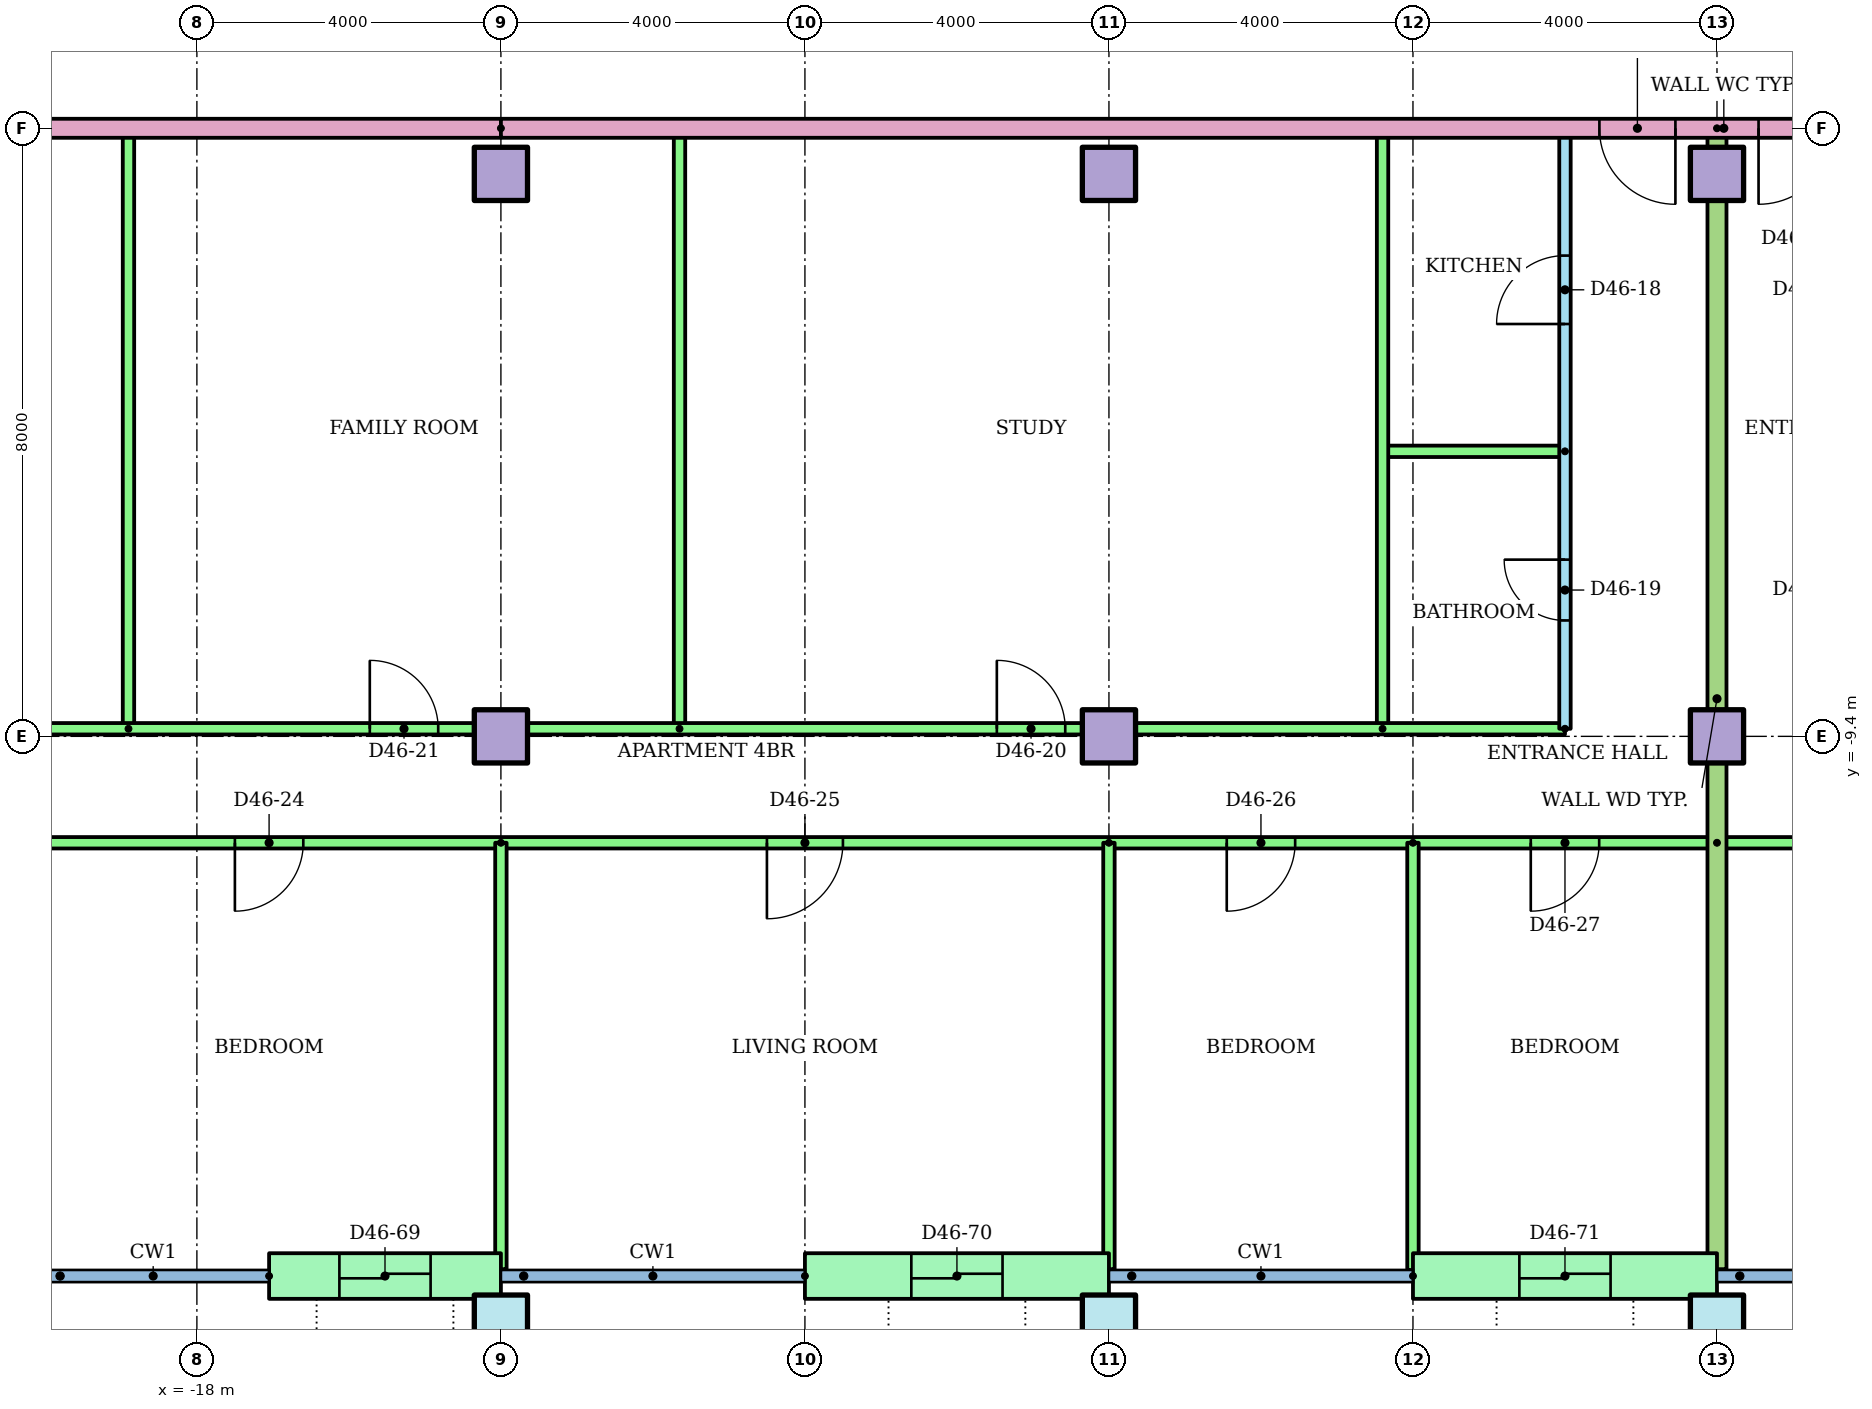
"""IFC4 building model, lengths in metres.
Left out: names, types, materials, properties, quantities, classifications, styles, units other than length and angle.
Written with IfcOpenShell. Run it as: python <this file> out.ifc"""

import sys

from ifc_helpers import new_model, si_unit, direction, frame, frame_2d, origin, origin_2d, place, context, subcontext, project, spatial, rectangle, hollow_rectangle, extrude, element, fill, save


model = new_model("IFC4")
c1 = context("Model", 3, precision=1e-05, world=origin(), true_north=direction((0.0, 1.0)))
c2 = subcontext(c1, "Body", "Model", "MODEL_VIEW")
j1 = project(units=[si_unit("LENGTHUNIT", "METRE"), si_unit("PLANEANGLEUNIT", "RADIAN")], contexts=[c1])
p1 = place(None, origin())
s1 = spatial("IfcSite", under=j1, at=p1, CompositionType="ELEMENT")
p2 = place(p1, origin())
s2 = spatial("IfcBuilding", under=s1, at=p2, CompositionType="ELEMENT")
p3 = place(p2, frame((0.0, 0.0, 178.1)))
s3 = spatial("IfcBuildingStorey", under=s2, at=p3, CompositionType="ELEMENT", Elevation=178.1)
for number, where in (
    (1, (-14.0, -17.1, 0.0)),
    (2, (-6.0, -17.1, 0.0)),
    (3, (2.0, -17.1, 0.0)),
):
    element("IfcColumn", number, at=place(p3, frame(where)), inside=s3, PredefinedType="COLUMN", context=c2, shape_type="SweptSolid", body=[
        extrude(hollow_rectangle(XDim=0.7, YDim=0.7, WallThickness=0.036, at=origin_2d()), origin(), (0.0, 0.0, 1.0), 3.2),
    ])
for number, where in (
    (4, (-14.0, -9.4, 0.0)),
    (5, (-6.0, -9.4, 0.0)),
    (6, (2.0, -9.4, 0.0)),
    (7, (-14.0, -2.0, 0.0)),
    (8, (-6.0, -2.0, 0.0)),
    (9, (2.0, -2.0, 0.0)),
):
    element("IfcColumn", number, at=place(p3, frame(where)), inside=s3, PredefinedType="COLUMN", context=c2, shape_type="SweptSolid", body=[
        extrude(rectangle(XDim=0.7, YDim=0.7, at=origin_2d()), origin(), (0.0, 0.0, 1.0), 3.2),
    ])
p4 = place(p3, frame((-17.05, -16.5, 0.0)))
e10 = element("IfcWall", 10, at=p4, inside=s3, PredefinedType="STANDARD", context=c2, shape_type="SweptSolid", body=[
    extrude(rectangle(XDim=3.05, YDim=0.6, at=frame_2d((1.525, 0.0))), origin(), (0.0, 0.0, 1.0), 2.92),
])
p5 = place(p4, frame((0.925, 0.0, 0.0)))
e11 = element("IfcOpeningElement", 11, at=p5, cuts=e10, PredefinedType="OPENING", context=c2, shape_type="SweptSolid", body=[
    extrude(rectangle(XDim=1.2, YDim=2.1, at=frame_2d((0.6, 1.05))), frame((0.0, 0.31, 0.0), z_axis=(0.0, -1.0, 0.0), x_axis=(1.0, 0.0, 0.0)), (0.0, 0.0, 1.0), 0.62),
])
p6 = place(p3, frame((-10.0, -16.5, 0.0)))
e12 = element("IfcWall", 12, at=p6, inside=s3, PredefinedType="STANDARD", context=c2, shape_type="SweptSolid", body=[
    extrude(rectangle(XDim=4.0, YDim=0.6, at=frame_2d((2.0, 0.0))), origin(), (0.0, 0.0, 1.0), 2.92),
])
p7 = place(p6, frame((1.4, 0.0, 0.0)))
e13 = element("IfcOpeningElement", 13, at=p7, cuts=e12, PredefinedType="OPENING", context=c2, shape_type="SweptSolid", body=[
    extrude(rectangle(XDim=1.2, YDim=2.1, at=frame_2d((0.6, 1.05))), frame((0.0, 0.31, 0.0), z_axis=(0.0, -1.0, 0.0), x_axis=(1.0, 0.0, 0.0)), (0.0, 0.0, 1.0), 0.62),
])
p8 = place(p3, frame((-2.0, -16.5, 0.0)))
e14 = element("IfcWall", 14, at=p8, inside=s3, PredefinedType="STANDARD", context=c2, shape_type="SweptSolid", body=[
    extrude(rectangle(XDim=4.0, YDim=0.6, at=frame_2d((2.0, 0.0))), origin(), (0.0, 0.0, 1.0), 2.92),
])
p9 = place(p8, frame((1.4, 0.0, 0.0)))
e15 = element("IfcOpeningElement", 15, at=p9, cuts=e14, PredefinedType="OPENING", context=c2, shape_type="SweptSolid", body=[
    extrude(rectangle(XDim=1.2, YDim=2.1, at=frame_2d((0.6, 1.05))), frame((0.0, 0.31, 0.0), z_axis=(0.0, -1.0, 0.0), x_axis=(1.0, 0.0, 0.0)), (0.0, 0.0, 1.0), 0.62),
])
p10 = place(p3, frame((0.0, -9.3, 0.0), z_axis=(0.0, 0.0, 1.0), x_axis=(0.0, 1.0, 0.0)))
e16 = element("IfcWall", 16, at=p10, inside=s3, PredefinedType="PARTITIONING", context=c2, shape_type="SweptSolid", body=[
    extrude(rectangle(XDim=7.9, YDim=0.15, at=frame_2d((3.95, 0.0))), origin(), (0.0, 0.0, 1.0), 2.4),
])
p11 = place(p10, frame((5.325, 0.0, 0.0)))
e17 = element("IfcOpeningElement", 17, at=p11, cuts=e16, PredefinedType="OPENING", context=c2, shape_type="SweptSolid", body=[
    extrude(rectangle(XDim=0.9, YDim=2.1, at=frame_2d((0.45, 1.05))), frame((0.0, 0.085, 0.0), z_axis=(0.0, -1.0, 0.0), x_axis=(1.0, 0.0, 0.0)), (0.0, 0.0, 1.0), 0.17),
])
p12 = place(p10, frame((1.425, 0.0, 0.0)))
e18 = element("IfcOpeningElement", 18, at=p12, cuts=e16, PredefinedType="OPENING", context=c2, shape_type="SweptSolid", body=[
    extrude(rectangle(XDim=0.8, YDim=2.1, at=frame_2d((0.4, 1.05))), frame((0.0, 0.085, 0.0), z_axis=(0.0, -1.0, 0.0), x_axis=(1.0, 0.0, 0.0)), (0.0, 0.0, 1.0), 0.17),
])
p13 = place(p3, frame((0.0, -5.65, 0.0), z_axis=(0.0, 0.0, 1.0), x_axis=(-1.0, 0.0, 0.0)))
e19 = element("IfcWall", 19, at=p13, inside=s3, PredefinedType="PARTITIONING", context=c2, shape_type="SweptSolid", body=[
    extrude(rectangle(XDim=2.4, YDim=0.15, at=frame_2d((1.2, 0.0))), origin(), (0.0, 0.0, 1.0), 2.4),
])
for number, where, z_axis, x_axis in (
    (20, (-2.4, -9.3, 0.0), (0.0, 0.0, 1.0), (0.0, 1.0, 0.0)),
    (21, (-11.65, -9.3, 0.0), (0.0, 0.0, 1.0), (0.0, 1.0, 0.0)),
    (22, (-18.9, -9.3, 0.0), (0.0, 0.0, 1.0), (0.0, 1.0, 0.0)),
):
    element("IfcWall", number, at=place(p3, frame(where, z_axis=z_axis, x_axis=x_axis)), inside=s3, PredefinedType="PARTITIONING", context=c2, shape_type="SweptSolid", body=[
        extrude(rectangle(XDim=7.9, YDim=0.15, at=frame_2d((3.95, 0.0))), origin(), (0.0, 0.0, 1.0), 2.4),
    ])
p14 = place(p3, frame((-24.81, -9.3, 0.0)))
e23 = element("IfcWall", 23, at=p14, inside=s3, PredefinedType="PARTITIONING", context=c2, shape_type="SweptSolid", body=[
    extrude(rectangle(XDim=24.81, YDim=0.15, at=frame_2d((12.405, 0.0))), origin(), (0.0, 0.0, 1.0), 2.4),
])
p15 = place(p14, frame((17.335, 0.0, 0.0)))
e24 = element("IfcOpeningElement", 24, at=p15, cuts=e23, PredefinedType="OPENING", context=c2, shape_type="SweptSolid", body=[
    extrude(rectangle(XDim=0.9, YDim=2.1, at=frame_2d((0.45, 1.05))), frame((0.0, 0.085, 0.0), z_axis=(0.0, -1.0, 0.0), x_axis=(1.0, 0.0, 0.0)), (0.0, 0.0, 1.0), 0.17),
])
p16 = place(p14, frame((9.085, 0.0, 0.0)))
e25 = element("IfcOpeningElement", 25, at=p16, cuts=e23, PredefinedType="OPENING", context=c2, shape_type="SweptSolid", body=[
    extrude(rectangle(XDim=0.9, YDim=2.1, at=frame_2d((0.45, 1.05))), frame((0.0, 0.085, 0.0), z_axis=(0.0, -1.0, 0.0), x_axis=(1.0, 0.0, 0.0)), (0.0, 0.0, 1.0), 0.17),
])
p17 = place(p14, frame((3.357, 0.0, 0.0)))
e26 = element("IfcOpeningElement", 26, at=p17, cuts=e23, PredefinedType="OPENING", context=c2, shape_type="SweptSolid", body=[
    extrude(rectangle(XDim=0.9, YDim=2.1, at=frame_2d((0.45, 1.05))), frame((0.0, 0.085, 0.0), z_axis=(0.0, -1.0, 0.0), x_axis=(1.0, 0.0, 0.0)), (0.0, 0.0, 1.0), 0.17),
])
p18 = place(p3, frame((2.0, -10.8, 0.0), z_axis=(0.0, 0.0, 1.0), x_axis=(-1.0, 0.0, 0.0)))
e27 = element("IfcWall", 27, at=p18, inside=s3, PredefinedType="PARTITIONING", context=c2, shape_type="SweptSolid", body=[
    extrude(rectangle(XDim=26.82, YDim=0.15, at=frame_2d((13.41, 0.0))), origin(), (0.0, 0.0, 1.0), 2.4),
])
p19 = place(p18, frame((24.547, 0.0, 0.0)))
e28 = element("IfcOpeningElement", 28, at=p19, cuts=e27, PredefinedType="OPENING", context=c2, shape_type="SweptSolid", body=[
    extrude(rectangle(XDim=0.9, YDim=2.1, at=frame_2d((0.45, 1.05))), frame((0.0, 0.085, 0.0), z_axis=(0.0, -1.0, 0.0), x_axis=(1.0, 0.0, 0.0)), (0.0, 0.0, 1.0), 0.17),
])
p20 = place(p18, frame((18.6, 0.0, 0.0)))
e29 = element("IfcOpeningElement", 29, at=p20, cuts=e27, PredefinedType="OPENING", context=c2, shape_type="SweptSolid", body=[
    extrude(rectangle(XDim=0.9, YDim=2.1, at=frame_2d((0.45, 1.05))), frame((0.0, 0.085, 0.0), z_axis=(0.0, -1.0, 0.0), x_axis=(1.0, 0.0, 0.0)), (0.0, 0.0, 1.0), 0.17),
])
p21 = place(p18, frame((11.5, 0.0, 0.0)))
e30 = element("IfcOpeningElement", 30, at=p21, cuts=e27, PredefinedType="OPENING", context=c2, shape_type="SweptSolid", body=[
    extrude(rectangle(XDim=1.0, YDim=2.1, at=frame_2d((0.5, 1.05))), frame((0.0, 0.085, 0.0), z_axis=(0.0, -1.0, 0.0), x_axis=(1.0, 0.0, 0.0)), (0.0, 0.0, 1.0), 0.17),
])
p22 = place(p18, frame((5.55, 0.0, 0.0)))
e31 = element("IfcOpeningElement", 31, at=p22, cuts=e27, PredefinedType="OPENING", context=c2, shape_type="SweptSolid", body=[
    extrude(rectangle(XDim=0.9, YDim=2.1, at=frame_2d((0.45, 1.05))), frame((0.0, 0.085, 0.0), z_axis=(0.0, -1.0, 0.0), x_axis=(1.0, 0.0, 0.0)), (0.0, 0.0, 1.0), 0.17),
])
p23 = place(p18, frame((1.55, 0.0, 0.0)))
e32 = element("IfcOpeningElement", 32, at=p23, cuts=e27, PredefinedType="OPENING", context=c2, shape_type="SweptSolid", body=[
    extrude(rectangle(XDim=0.9, YDim=2.1, at=frame_2d((0.45, 1.05))), frame((0.0, 0.085, 0.0), z_axis=(0.0, -1.0, 0.0), x_axis=(1.0, 0.0, 0.0)), (0.0, 0.0, 1.0), 0.17),
])
for number, where, z_axis, x_axis in (
    (33, (-14.0, -10.8, 0.0), (0.0, 0.0, 1.0), (0.0, -1.0, 0.0)),
    (34, (-6.0, -10.8, 0.0), (0.0, 0.0, 1.0), (0.0, -1.0, 0.0)),
):
    element("IfcWall", number, at=place(p3, frame(where, z_axis=z_axis, x_axis=x_axis)), inside=s3, PredefinedType="PARTITIONING", context=c2, shape_type="SweptSolid", body=[
        extrude(rectangle(XDim=5.61, YDim=0.15, at=frame_2d((2.805, 0.0))), origin(), (0.0, 0.0, 1.0), 2.4),
    ])
p24 = place(p3, frame((-2.0, -10.8, 0.0), z_axis=(0.0, 0.0, 1.0), x_axis=(0.0, -1.0, 0.0)))
e35 = element("IfcWall", 35, at=p24, inside=s3, PredefinedType="PARTITIONING", context=c2, shape_type="SweptSolid", body=[
    extrude(rectangle(XDim=5.621, YDim=0.15, at=frame_2d((2.811, 0.0))), origin(), (0.0, 0.0, 1.0), 2.4),
])
p25 = place(p3, frame((18.0, -10.8, 0.0), z_axis=(0.0, 0.0, 1.0), x_axis=(-1.0, 0.0, 0.0)))
e36 = element("IfcWall", 36, at=p25, inside=s3, PredefinedType="PARTITIONING", context=c2, shape_type="SweptSolid", body=[
    extrude(rectangle(XDim=16.0, YDim=0.15, at=frame_2d((8.0, 0.0))), origin(), (0.0, 0.0, 1.0), 2.4),
])
p26 = place(p25, frame((11.5, 0.0, 0.0)))
e37 = element("IfcOpeningElement", 37, at=p26, cuts=e36, PredefinedType="OPENING", context=c2, shape_type="SweptSolid", body=[
    extrude(rectangle(XDim=1.0, YDim=2.1, at=frame_2d((0.5, 1.05))), frame((0.0, 0.085, 0.0), z_axis=(0.0, -1.0, 0.0), x_axis=(1.0, 0.0, 0.0)), (0.0, 0.0, 1.0), 0.17),
])
p27 = place(p25, frame((5.55, 0.0, 0.0)))
e38 = element("IfcOpeningElement", 38, at=p27, cuts=e36, PredefinedType="OPENING", context=c2, shape_type="SweptSolid", body=[
    extrude(rectangle(XDim=0.9, YDim=2.1, at=frame_2d((0.45, 1.05))), frame((0.0, 0.085, 0.0), z_axis=(0.0, -1.0, 0.0), x_axis=(1.0, 0.0, 0.0)), (0.0, 0.0, 1.0), 0.17),
])
p28 = place(p25, frame((1.55, 0.0, 0.0)))
e39 = element("IfcOpeningElement", 39, at=p28, cuts=e36, PredefinedType="OPENING", context=c2, shape_type="SweptSolid", body=[
    extrude(rectangle(XDim=0.9, YDim=2.1, at=frame_2d((0.45, 1.05))), frame((0.0, 0.085, 0.0), z_axis=(0.0, -1.0, 0.0), x_axis=(1.0, 0.0, 0.0)), (0.0, 0.0, 1.0), 0.17),
])
p29 = place(p3, frame((2.0, -1.4, 0.0), z_axis=(0.0, 0.0, 1.0), x_axis=(0.0, -1.0, 0.0)))
e40 = element("IfcWall", 40, at=p29, inside=s3, PredefinedType="PARTITIONING", context=c2, shape_type="SweptSolid", body=[
    extrude(rectangle(XDim=15.01, YDim=0.25, at=frame_2d((7.505, 0.0))), origin(), (0.0, 0.0, 1.0), 2.4),
])
p30 = place(p3, frame((-14.0, -1.4, 0.0), z_axis=(0.0, 0.0, 1.0), x_axis=(-1.0, 0.0, 0.0)))
e41 = element("IfcWall", 41, at=p30, inside=s3, PredefinedType="PARTITIONING", context=c2, shape_type="SweptSolid", body=[
    extrude(rectangle(XDim=10.82, YDim=0.25, at=frame_2d((5.41, 0.0))), origin(), (0.0, 0.0, 1.0), 2.4),
])
p31 = place(p3, frame((14.0, -1.4, 0.0), z_axis=(0.0, 0.0, 1.0), x_axis=(-1.0, 0.0, 0.0)))
e42 = element("IfcWall", 42, at=p31, inside=s3, PredefinedType="PARTITIONING", context=c2, shape_type="SweptSolid", body=[
    extrude(rectangle(XDim=28.0, YDim=0.25, at=frame_2d((14.0, 0.0))), origin(), (0.0, 0.0, 1.0), 2.4),
])
p32 = place(p31, frame((12.547, 0.0, 0.0)))
e43 = element("IfcOpeningElement", 43, at=p32, cuts=e42, PredefinedType="OPENING", context=c2, shape_type="SweptSolid", body=[
    extrude(rectangle(XDim=1.0, YDim=2.1, at=frame_2d((0.5, 1.05))), frame((0.0, 0.135, 0.0), z_axis=(0.0, -1.0, 0.0), x_axis=(1.0, 0.0, 0.0)), (0.0, 0.0, 1.0), 0.27),
])
p33 = place(p31, frame((10.453, 0.0, 0.0)))
e44 = element("IfcOpeningElement", 44, at=p33, cuts=e42, PredefinedType="OPENING", context=c2, shape_type="SweptSolid", body=[
    extrude(rectangle(XDim=1.0, YDim=2.1, at=frame_2d((0.5, 1.05))), frame((0.0, 0.135, 0.0), z_axis=(0.0, -1.0, 0.0), x_axis=(1.0, 0.0, 0.0)), (0.0, 0.0, 1.0), 0.27),
])
p34 = place(p11, origin())
e45 = element("IfcDoor", 45, at=p34, inside=s3, OperationType="SINGLE_SWING_LEFT", PredefinedType="DOOR", context=c2, shape_type="SweptSolid", body=[
    extrude(rectangle(XDim=0.9, YDim=2.1, at=frame_2d((0.45, 1.05))), frame((0.0, 0.025, 0.0), z_axis=(0.0, -1.0, 0.0), x_axis=(1.0, 0.0, 0.0)), (0.0, 0.0, 1.0), 0.05),
])
fill(e17, e45)
p35 = place(p12, origin())
e46 = element("IfcDoor", 46, at=p35, inside=s3, OperationType="SINGLE_SWING_RIGHT", PredefinedType="DOOR", context=c2, shape_type="SweptSolid", body=[
    extrude(rectangle(XDim=0.8, YDim=2.1, at=frame_2d((0.4, 1.05))), frame((0.0, 0.025, 0.0), z_axis=(0.0, -1.0, 0.0), x_axis=(1.0, 0.0, 0.0)), (0.0, 0.0, 1.0), 0.05),
])
fill(e18, e46)
p36 = place(p15, origin())
e47 = element("IfcDoor", 47, at=p36, inside=s3, OperationType="SINGLE_SWING_LEFT", PredefinedType="DOOR", context=c2, shape_type="SweptSolid", body=[
    extrude(rectangle(XDim=0.9, YDim=2.1, at=frame_2d((0.45, 1.05))), frame((0.0, 0.025, 0.0), z_axis=(0.0, -1.0, 0.0), x_axis=(1.0, 0.0, 0.0)), (0.0, 0.0, 1.0), 0.05),
])
fill(e24, e47)
p37 = place(p16, origin())
e48 = element("IfcDoor", 48, at=p37, inside=s3, OperationType="SINGLE_SWING_LEFT", PredefinedType="DOOR", context=c2, shape_type="SweptSolid", body=[
    extrude(rectangle(XDim=0.9, YDim=2.1, at=frame_2d((0.45, 1.05))), frame((0.0, 0.025, 0.0), z_axis=(0.0, -1.0, 0.0), x_axis=(1.0, 0.0, 0.0)), (0.0, 0.0, 1.0), 0.05),
])
fill(e25, e48)
p38 = place(p20, origin())
e49 = element("IfcDoor", 49, at=p38, inside=s3, OperationType="SINGLE_SWING_RIGHT", PredefinedType="DOOR", context=c2, shape_type="SweptSolid", body=[
    extrude(rectangle(XDim=0.9, YDim=2.1, at=frame_2d((0.45, 1.05))), frame((0.0, 0.025, 0.0), z_axis=(0.0, -1.0, 0.0), x_axis=(1.0, 0.0, 0.0)), (0.0, 0.0, 1.0), 0.05),
])
fill(e29, e49)
p39 = place(p21, origin())
e50 = element("IfcDoor", 50, at=p39, inside=s3, OperationType="SINGLE_SWING_RIGHT", PredefinedType="DOOR", context=c2, shape_type="SweptSolid", body=[
    extrude(rectangle(XDim=1.0, YDim=2.1, at=frame_2d((0.5, 1.05))), frame((0.0, 0.025, 0.0), z_axis=(0.0, -1.0, 0.0), x_axis=(1.0, 0.0, 0.0)), (0.0, 0.0, 1.0), 0.05),
])
fill(e30, e50)
p40 = place(p22, origin())
e51 = element("IfcDoor", 51, at=p40, inside=s3, OperationType="SINGLE_SWING_RIGHT", PredefinedType="DOOR", context=c2, shape_type="SweptSolid", body=[
    extrude(rectangle(XDim=0.9, YDim=2.1, at=frame_2d((0.45, 1.05))), frame((0.0, 0.025, 0.0), z_axis=(0.0, -1.0, 0.0), x_axis=(1.0, 0.0, 0.0)), (0.0, 0.0, 1.0), 0.05),
])
fill(e31, e51)
p41 = place(p23, origin())
e52 = element("IfcDoor", 52, at=p41, inside=s3, OperationType="SINGLE_SWING_RIGHT", PredefinedType="DOOR", context=c2, shape_type="SweptSolid", body=[
    extrude(rectangle(XDim=0.9, YDim=2.1, at=frame_2d((0.45, 1.05))), frame((0.0, 0.025, 0.0), z_axis=(0.0, -1.0, 0.0), x_axis=(1.0, 0.0, 0.0)), (0.0, 0.0, 1.0), 0.05),
])
fill(e32, e52)
p42 = place(p32, origin())
e53 = element("IfcDoor", 53, at=p42, inside=s3, OperationType="SINGLE_SWING_LEFT", PredefinedType="DOOR", context=c2, shape_type="SweptSolid", body=[
    extrude(rectangle(XDim=1.0, YDim=2.1, at=frame_2d((0.5, 1.05))), frame((0.0, 0.025, 0.0), z_axis=(0.0, -1.0, 0.0), x_axis=(1.0, 0.0, 0.0)), (0.0, 0.0, 1.0), 0.05),
])
fill(e43, e53)
p43 = place(p33, origin())
e54 = element("IfcDoor", 54, at=p43, inside=s3, OperationType="SINGLE_SWING_RIGHT", PredefinedType="DOOR", context=c2, shape_type="SweptSolid", body=[
    extrude(rectangle(XDim=1.0, YDim=2.1, at=frame_2d((0.5, 1.05))), frame((0.0, 0.025, 0.0), z_axis=(0.0, -1.0, 0.0), x_axis=(1.0, 0.0, 0.0)), (0.0, 0.0, 1.0), 0.05),
])
fill(e44, e54)
p44 = place(p5, origin())
e55 = element("IfcDoor", 55, at=p44, inside=s3, OperationType="SLIDING_TO_LEFT", PredefinedType="DOOR", context=c2, shape_type="SweptSolid", body=[
    extrude(rectangle(XDim=1.2, YDim=2.1, at=frame_2d((0.6, 1.05))), frame((0.0, 0.025, 0.0), z_axis=(0.0, -1.0, 0.0), x_axis=(1.0, 0.0, 0.0)), (0.0, 0.0, 1.0), 0.05),
])
fill(e11, e55)
p45 = place(p7, origin())
e56 = element("IfcDoor", 56, at=p45, inside=s3, OperationType="SLIDING_TO_LEFT", PredefinedType="DOOR", context=c2, shape_type="SweptSolid", body=[
    extrude(rectangle(XDim=1.2, YDim=2.1, at=frame_2d((0.6, 1.05))), frame((0.0, 0.025, 0.0), z_axis=(0.0, -1.0, 0.0), x_axis=(1.0, 0.0, 0.0)), (0.0, 0.0, 1.0), 0.05),
])
fill(e13, e56)
p46 = place(p9, origin())
e57 = element("IfcDoor", 57, at=p46, inside=s3, OperationType="SLIDING_TO_LEFT", PredefinedType="DOOR", context=c2, shape_type="SweptSolid", body=[
    extrude(rectangle(XDim=1.2, YDim=2.1, at=frame_2d((0.6, 1.05))), frame((0.0, 0.025, 0.0), z_axis=(0.0, -1.0, 0.0), x_axis=(1.0, 0.0, 0.0)), (0.0, 0.0, 1.0), 0.05),
])
fill(e15, e57)
save(model, sys.argv[1])
